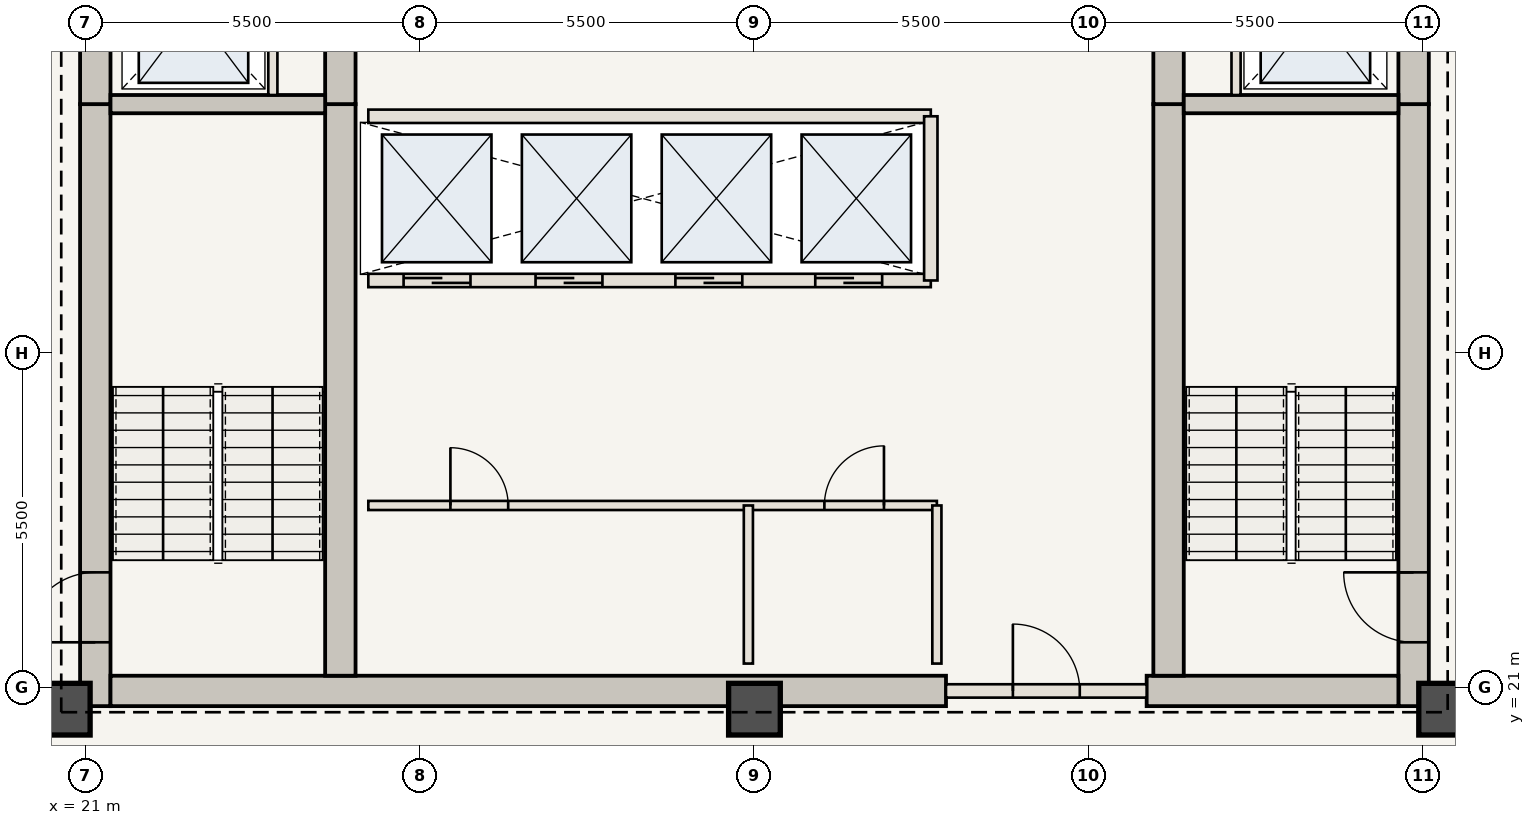
"""IFC4 building model, lengths in metres.
Left out: names, types, materials, properties, quantities, classifications, styles, units other than length and angle.
Written with IfcOpenShell. Run it as: python <this file> out.ifc"""

import sys

from ifc_helpers import new_model, si_unit, direction, frame, frame_2d, origin, origin_2d, place, context, subcontext, project, spatial, rectangle, extrude, element, fill, save


model = new_model("IFC4")
c1 = context("Model", 3, precision=1e-05, world=origin(), true_north=direction((0.0, 1.0)))
c2 = subcontext(c1, "Body", "Model", "MODEL_VIEW")
j1 = project(units=[si_unit("LENGTHUNIT", "METRE"), si_unit("PLANEANGLEUNIT", "RADIAN")], contexts=[c1])
p1 = place(None, origin())
s1 = spatial("IfcSite", under=j1, at=p1, CompositionType="ELEMENT")
p2 = place(p1, origin())
s2 = spatial("IfcBuilding", under=s1, at=p2, CompositionType="ELEMENT")
p3 = place(p2, frame((0.0, 0.0, 221.55)))
s3 = spatial("IfcBuildingStorey", under=s2, at=p3, CompositionType="ELEMENT", Elevation=221.55)
p4 = place(p3, frame((21.16, 20.7, 0.0), z_axis=(0.0, 0.0, 1.0), x_axis=(0.0, 1.0, 0.0)))
e1 = element("IfcWall", 1, at=p4, inside=s3, PredefinedType="SHEAR", context=c2, shape_type="SweptSolid", body=[
    extrude(rectangle(XDim=9.9, YDim=0.5, at=frame_2d((4.95, 0.0))), origin(), (0.0, 0.0, 1.0), 3.85),
])
p5 = place(p4, frame((1.05, 0.0, 0.0)))
e2 = element("IfcOpeningElement", 2, at=p5, cuts=e1, PredefinedType="OPENING", context=c2, shape_type="SweptSolid", body=[
    extrude(rectangle(XDim=1.15, YDim=2.15, at=frame_2d((0.575, 1.075))), frame((0.0, 0.26, 0.0), z_axis=(0.0, -1.0, 0.0), x_axis=(1.0, 0.0, 0.0)), (0.0, 0.0, 1.0), 0.52),
])
p6 = place(p3, frame((21.16, 30.6, 0.0), z_axis=(0.0, 0.0, 1.0), x_axis=(0.0, 1.0, 0.0)))
e3 = element("IfcWall", 3, at=p6, inside=s3, PredefinedType="SHEAR", context=c2, shape_type="SweptSolid", body=[
    extrude(rectangle(XDim=12.65, YDim=0.5, at=frame_2d((6.325, 0.0))), origin(), (0.0, 0.0, 1.0), 3.85),
])
p7 = place(p6, frame((4.2, 0.0, 0.0)))
e4 = element("IfcOpeningElement", 4, at=p7, cuts=e3, PredefinedType="OPENING", context=c2, shape_type="SweptSolid", body=[
    extrude(rectangle(XDim=1.1, YDim=2.15, at=frame_2d((0.55, 1.075))), frame((0.0, 0.26, 0.0), z_axis=(0.0, -1.0, 0.0), x_axis=(1.0, 0.0, 0.0)), (0.0, 0.0, 1.0), 0.52),
])
p8 = place(p6, frame((8.05, 0.0, 0.0)))
e5 = element("IfcOpeningElement", 5, at=p8, cuts=e3, PredefinedType="OPENING", context=c2, shape_type="SweptSolid", body=[
    extrude(rectangle(XDim=0.92, YDim=2.1, at=frame_2d((0.46, 1.05))), frame((0.0, 0.26, 0.0), z_axis=(0.0, -1.0, 0.0), x_axis=(1.0, 0.0, 0.0)), (0.0, 0.0, 1.0), 0.52),
])
p9 = place(p6, frame((9.45, 0.0, 0.0)))
e6 = element("IfcOpeningElement", 6, at=p9, cuts=e3, PredefinedType="OPENING", context=c2, shape_type="SweptSolid", body=[
    extrude(rectangle(XDim=0.88, YDim=2.1, at=frame_2d((0.44, 1.05))), frame((0.0, 0.26, 0.0), z_axis=(0.0, -1.0, 0.0), x_axis=(1.0, 0.0, 0.0)), (0.0, 0.0, 1.0), 0.52),
])
p10 = place(p6, frame((10.85, 0.0, 0.0)))
e7 = element("IfcOpeningElement", 7, at=p10, cuts=e3, PredefinedType="OPENING", context=c2, shape_type="SweptSolid", body=[
    extrude(rectangle(XDim=0.88, YDim=2.1, at=frame_2d((0.44, 1.05))), frame((0.0, 0.26, 0.0), z_axis=(0.0, -1.0, 0.0), x_axis=(1.0, 0.0, 0.0)), (0.0, 0.0, 1.0), 0.52),
])
p11 = place(p3, frame((42.84, 20.7, 0.0), z_axis=(0.0, 0.0, 1.0), x_axis=(0.0, 1.0, 0.0)))
e8 = element("IfcWall", 8, at=p11, inside=s3, PredefinedType="SHEAR", context=c2, shape_type="SweptSolid", body=[
    extrude(rectangle(XDim=9.9, YDim=0.5, at=frame_2d((4.95, 0.0))), origin(), (0.0, 0.0, 1.0), 3.85),
])
p12 = place(p11, frame((1.05, 0.0, 0.0)))
e9 = element("IfcOpeningElement", 9, at=p12, cuts=e8, PredefinedType="OPENING", context=c2, shape_type="SweptSolid", body=[
    extrude(rectangle(XDim=1.15, YDim=2.15, at=frame_2d((0.575, 1.075))), frame((0.0, 0.26, 0.0), z_axis=(0.0, -1.0, 0.0), x_axis=(1.0, 0.0, 0.0)), (0.0, 0.0, 1.0), 0.52),
])
p13 = place(p3, frame((42.84, 30.6, 0.0), z_axis=(0.0, 0.0, 1.0), x_axis=(0.0, 1.0, 0.0)))
e10 = element("IfcWall", 10, at=p13, inside=s3, PredefinedType="SHEAR", context=c2, shape_type="SweptSolid", body=[
    extrude(rectangle(XDim=12.65, YDim=0.5, at=frame_2d((6.325, 0.0))), origin(), (0.0, 0.0, 1.0), 3.85),
])
p14 = place(p13, frame((4.2, 0.0, 0.0)))
e11 = element("IfcOpeningElement", 11, at=p14, cuts=e10, PredefinedType="OPENING", context=c2, shape_type="SweptSolid", body=[
    extrude(rectangle(XDim=1.1, YDim=2.15, at=frame_2d((0.55, 1.075))), frame((0.0, 0.26, 0.0), z_axis=(0.0, -1.0, 0.0), x_axis=(1.0, 0.0, 0.0)), (0.0, 0.0, 1.0), 0.52),
])
p15 = place(p13, frame((9.2, 0.0, 0.0)))
e12 = element("IfcOpeningElement", 12, at=p15, cuts=e10, PredefinedType="OPENING", context=c2, shape_type="SweptSolid", body=[
    extrude(rectangle(XDim=0.92, YDim=2.1, at=frame_2d((0.46, 1.05))), frame((0.0, 0.26, 0.0), z_axis=(0.0, -1.0, 0.0), x_axis=(1.0, 0.0, 0.0)), (0.0, 0.0, 1.0), 0.52),
])
p16 = place(p3, frame((21.41, 20.95, 0.0), z_axis=(0.0, 0.0, 1.0), x_axis=(1.0, 0.0, 0.0)))
e13 = element("IfcWall", 13, at=p16, inside=s3, PredefinedType="SHEAR", context=c2, shape_type="SweptSolid", body=[
    extrude(rectangle(XDim=13.74, YDim=0.5, at=frame_2d((6.87, 0.0))), origin(), (0.0, 0.0, 1.0), 3.85),
])
p17 = place(p3, frame((38.45, 20.95, 0.0), z_axis=(0.0, 0.0, 1.0), x_axis=(1.0, 0.0, 0.0)))
e14 = element("IfcWall", 14, at=p17, inside=s3, PredefinedType="SHEAR", context=c2, shape_type="SweptSolid", body=[
    extrude(rectangle(XDim=4.14, YDim=0.5, at=frame_2d((2.07, 0.0))), origin(), (0.0, 0.0, 1.0), 3.85),
])
p18 = place(p3, frame((25.19, 21.2, 0.0), z_axis=(0.0, 0.0, 1.0), x_axis=(0.0, 1.0, 0.0)))
e15 = element("IfcWall", 15, at=p18, inside=s3, PredefinedType="SHEAR", context=c2, shape_type="SweptSolid", body=[
    extrude(rectangle(XDim=9.4, YDim=0.5, at=frame_2d((4.7, 0.0))), origin(), (0.0, 0.0, 1.0), 3.85),
])
p19 = place(p3, frame((25.19, 30.6, 0.0), z_axis=(0.0, 0.0, 1.0), x_axis=(0.0, 1.0, 0.0)))
e16 = element("IfcWall", 16, at=p19, inside=s3, PredefinedType="SHEAR", context=c2, shape_type="SweptSolid", body=[
    extrude(rectangle(XDim=12.15, YDim=0.5, at=frame_2d((6.075, 0.0))), origin(), (0.0, 0.0, 1.0), 3.85),
])
p20 = place(p19, frame((6.25, 0.0, 0.0)))
e17 = element("IfcOpeningElement", 17, at=p20, cuts=e16, PredefinedType="OPENING", context=c2, shape_type="SweptSolid", body=[
    extrude(rectangle(XDim=1.1, YDim=2.15, at=frame_2d((0.55, 1.075))), frame((0.0, 0.26, 0.0), z_axis=(0.0, -1.0, 0.0), x_axis=(1.0, 0.0, 0.0)), (0.0, 0.0, 1.0), 0.52),
])
p21 = place(p3, frame((38.81, 21.2, 0.0), z_axis=(0.0, 0.0, 1.0), x_axis=(0.0, 1.0, 0.0)))
e18 = element("IfcWall", 18, at=p21, inside=s3, PredefinedType="SHEAR", context=c2, shape_type="SweptSolid", body=[
    extrude(rectangle(XDim=9.4, YDim=0.5, at=frame_2d((4.7, 0.0))), origin(), (0.0, 0.0, 1.0), 3.85),
])
p22 = place(p3, frame((38.81, 30.6, 0.0), z_axis=(0.0, 0.0, 1.0), x_axis=(0.0, 1.0, 0.0)))
e19 = element("IfcWall", 19, at=p22, inside=s3, PredefinedType="SHEAR", context=c2, shape_type="SweptSolid", body=[
    extrude(rectangle(XDim=12.15, YDim=0.5, at=frame_2d((6.075, 0.0))), origin(), (0.0, 0.0, 1.0), 3.85),
])
for number, where, z_axis, x_axis in (
    (20, (20.65, 20.65, 0.0), (0.0, 0.0, 1.0), (1.0, 0.0, 0.0)),
    (21, (32.0, 20.65, 0.0), (0.0, 0.0, 1.0), (1.0, 0.0, 0.0)),
    (22, (43.35, 20.65, 0.0), (0.0, 0.0, 1.0), (1.0, 0.0, 0.0)),
):
    element("IfcColumn", number, at=place(p3, frame(where, z_axis=z_axis, x_axis=x_axis)), inside=s3, PredefinedType="COLUMN", context=c2, shape_type="SweptSolid", body=[
        extrude(rectangle(XDim=0.85, YDim=0.85, at=origin_2d()), origin(), (0.0, 0.0, 1.0), 3.85),
    ])
for number, where, z_axis, x_axis in (
    (23, (21.41, 30.6, 0.0), (0.0, 0.0, 1.0), (1.0, 0.0, 0.0)),
    (24, (39.06, 30.6, 0.0), (0.0, 0.0, 1.0), (1.0, 0.0, 0.0)),
):
    element("IfcWall", number, at=place(p3, frame(where, z_axis=z_axis, x_axis=x_axis)), inside=s3, PredefinedType="SHEAR", context=c2, shape_type="SweptSolid", body=[
        extrude(rectangle(XDim=3.53, YDim=0.3, at=frame_2d((1.765, 0.0))), origin(), (0.0, 0.0, 1.0), 3.685),
    ])
for number, where, z_axis, x_axis in (
    (25, (24.08, 30.75, 0.0), (0.0, 0.0, 1.0), (0.0, 1.0, 0.0)),
    (26, (39.92, 30.75, 0.0), (0.0, 0.0, 1.0), (0.0, 1.0, 0.0)),
):
    element("IfcWall", number, at=place(p3, frame(where, z_axis=z_axis, x_axis=x_axis)), inside=s3, PredefinedType="STANDARD", context=c2, shape_type="SweptSolid", body=[
        extrude(rectangle(XDim=2.65, YDim=0.15, at=frame_2d((1.325, 0.0))), origin(), (0.0, 0.0, 1.0), 3.685),
    ])
p23 = place(p3, frame((35.15, 20.95, 0.0), z_axis=(0.0, 0.0, 1.0), x_axis=(1.0, 0.0, 0.0)))
e27 = element("IfcWall", 27, at=p23, inside=s3, PredefinedType="STANDARD", context=c2, shape_type="SweptSolid", body=[
    extrude(rectangle(XDim=3.3, YDim=0.22, at=frame_2d((1.65, 0.0))), origin(), (0.0, 0.0, 1.0), 3.685),
])
p24 = place(p23, frame((1.1, 0.0, 0.0)))
e28 = element("IfcOpeningElement", 28, at=p24, cuts=e27, PredefinedType="OPENING", context=c2, shape_type="SweptSolid", body=[
    extrude(rectangle(XDim=1.1, YDim=2.15, at=frame_2d((0.55, 1.075))), frame((0.0, 0.12, 0.0), z_axis=(0.0, -1.0, 0.0), x_axis=(1.0, 0.0, 0.0)), (0.0, 0.0, 1.0), 0.24),
])
p25 = place(p3, frame((25.65, 24.0, 0.0), z_axis=(0.0, 0.0, 1.0), x_axis=(1.0, 0.0, 0.0)))
e29 = element("IfcWall", 29, at=p25, inside=s3, PredefinedType="STANDARD", context=c2, shape_type="SweptSolid", body=[
    extrude(rectangle(XDim=9.35, YDim=0.15, at=frame_2d((4.675, 0.0))), origin(), (0.0, 0.0, 1.0), 3.685),
])
p26 = place(p25, frame((1.35, 0.0, 0.0)))
e30 = element("IfcOpeningElement", 30, at=p26, cuts=e29, PredefinedType="OPENING", context=c2, shape_type="SweptSolid", body=[
    extrude(rectangle(XDim=0.95, YDim=2.15, at=frame_2d((0.475, 1.075))), frame((0.0, 0.085, 0.0), z_axis=(0.0, -1.0, 0.0), x_axis=(1.0, 0.0, 0.0)), (0.0, 0.0, 1.0), 0.17),
])
p27 = place(p25, frame((7.5, 0.0, 0.0)))
e31 = element("IfcOpeningElement", 31, at=p27, cuts=e29, PredefinedType="OPENING", context=c2, shape_type="SweptSolid", body=[
    extrude(rectangle(XDim=0.98, YDim=2.2, at=frame_2d((0.49, 1.1))), frame((0.0, 0.085, 0.0), z_axis=(0.0, -1.0, 0.0), x_axis=(1.0, 0.0, 0.0)), (0.0, 0.0, 1.0), 0.17),
])
for number, where, z_axis, x_axis in (
    (32, (31.9, 21.4, 0.0), (0.0, 0.0, 1.0), (0.0, 1.0, 0.0)),
    (33, (35.0, 21.4, 0.0), (0.0, 0.0, 1.0), (0.0, 1.0, 0.0)),
):
    element("IfcWall", number, at=place(p3, frame(where, z_axis=z_axis, x_axis=x_axis)), inside=s3, PredefinedType="STANDARD", context=c2, shape_type="SweptSolid", body=[
        extrude(rectangle(XDim=2.6, YDim=0.15, at=frame_2d((1.3, 0.0))), origin(), (0.0, 0.0, 1.0), 3.685),
    ])
p28 = place(p3, frame((25.65, 27.7, 0.0), z_axis=(0.0, 0.0, 1.0), x_axis=(1.0, 0.0, 0.0)))
e34 = element("IfcWall", 34, at=p28, inside=s3, PredefinedType="STANDARD", context=c2, shape_type="SweptSolid", body=[
    extrude(rectangle(XDim=9.25, YDim=0.22, at=frame_2d((4.625, 0.0))), origin(), (0.0, 0.0, 1.0), 3.685),
])
p29 = place(p28, frame((0.58, 0.0, 0.0)))
e35 = element("IfcOpeningElement", 35, at=p29, cuts=e34, PredefinedType="OPENING", context=c2, shape_type="SweptSolid", body=[
    extrude(rectangle(XDim=1.1, YDim=2.15, at=frame_2d((0.55, 1.075))), frame((0.0, 0.12, 0.0), z_axis=(0.0, -1.0, 0.0), x_axis=(1.0, 0.0, 0.0)), (0.0, 0.0, 1.0), 0.24),
])
p30 = place(p28, frame((2.75, 0.0, 0.0)))
e36 = element("IfcOpeningElement", 36, at=p30, cuts=e34, PredefinedType="OPENING", context=c2, shape_type="SweptSolid", body=[
    extrude(rectangle(XDim=1.1, YDim=2.15, at=frame_2d((0.55, 1.075))), frame((0.0, 0.12, 0.0), z_axis=(0.0, -1.0, 0.0), x_axis=(1.0, 0.0, 0.0)), (0.0, 0.0, 1.0), 0.24),
])
p31 = place(p28, frame((5.05, 0.0, 0.0)))
e37 = element("IfcOpeningElement", 37, at=p31, cuts=e34, PredefinedType="OPENING", context=c2, shape_type="SweptSolid", body=[
    extrude(rectangle(XDim=1.1, YDim=2.15, at=frame_2d((0.55, 1.075))), frame((0.0, 0.12, 0.0), z_axis=(0.0, -1.0, 0.0), x_axis=(1.0, 0.0, 0.0)), (0.0, 0.0, 1.0), 0.24),
])
p32 = place(p28, frame((7.35, 0.0, 0.0)))
e38 = element("IfcOpeningElement", 38, at=p32, cuts=e34, PredefinedType="OPENING", context=c2, shape_type="SweptSolid", body=[
    extrude(rectangle(XDim=1.1, YDim=2.15, at=frame_2d((0.55, 1.075))), frame((0.0, 0.12, 0.0), z_axis=(0.0, -1.0, 0.0), x_axis=(1.0, 0.0, 0.0)), (0.0, 0.0, 1.0), 0.24),
])
p33 = place(p3, frame((25.65, 30.4, 0.0), z_axis=(0.0, 0.0, 1.0), x_axis=(1.0, 0.0, 0.0)))
e39 = element("IfcWall", 39, at=p33, inside=s3, PredefinedType="STANDARD", context=c2, shape_type="SweptSolid", body=[
    extrude(rectangle(XDim=9.25, YDim=0.22, at=frame_2d((4.625, 0.0))), origin(), (0.0, 0.0, 1.0), 3.685),
])
p34 = place(p3, frame((34.9, 27.7, 0.0), z_axis=(0.0, 0.0, 1.0), x_axis=(0.0, 1.0, 0.0)))
e40 = element("IfcWall", 40, at=p34, inside=s3, PredefinedType="STANDARD", context=c2, shape_type="SweptSolid", body=[
    extrude(rectangle(XDim=2.7, YDim=0.22, at=frame_2d((1.35, 0.0))), origin(), (0.0, 0.0, 1.0), 3.685),
])
p35 = place(p5, origin())
e41 = element("IfcDoor", 41, at=p35, inside=s3, OperationType="SINGLE_SWING_LEFT", PredefinedType="DOOR", context=c2, shape_type="SweptSolid", body=[
    extrude(rectangle(XDim=1.15, YDim=2.15, at=frame_2d((0.575, 1.075))), frame((0.0, 0.025, 0.0), z_axis=(0.0, -1.0, 0.0), x_axis=(1.0, 0.0, 0.0)), (0.0, 0.0, 1.0), 0.05),
])
fill(e2, e41)
p36 = place(p12, origin())
e42 = element("IfcDoor", 42, at=p36, inside=s3, OperationType="SINGLE_SWING_RIGHT", PredefinedType="DOOR", context=c2, shape_type="SweptSolid", body=[
    extrude(rectangle(XDim=1.15, YDim=2.15, at=frame_2d((0.575, 1.075))), frame((0.0, 0.025, 0.0), z_axis=(0.0, -1.0, 0.0), x_axis=(1.0, 0.0, 0.0)), (0.0, 0.0, 1.0), 0.05),
])
fill(e9, e42)
p37 = place(p24, origin())
e43 = element("IfcDoor", 43, at=p37, inside=s3, OperationType="SINGLE_SWING_LEFT", PredefinedType="DOOR", context=c2, shape_type="SweptSolid", body=[
    extrude(rectangle(XDim=1.1, YDim=2.15, at=frame_2d((0.55, 1.075))), frame((0.0, 0.025, 0.0), z_axis=(0.0, -1.0, 0.0), x_axis=(1.0, 0.0, 0.0)), (0.0, 0.0, 1.0), 0.05),
])
fill(e28, e43)
p38 = place(p26, origin())
e44 = element("IfcDoor", 44, at=p38, inside=s3, OperationType="SINGLE_SWING_LEFT", PredefinedType="DOOR", context=c2, shape_type="SweptSolid", body=[
    extrude(rectangle(XDim=0.95, YDim=2.15, at=frame_2d((0.475, 1.075))), frame((0.0, 0.025, 0.0), z_axis=(0.0, -1.0, 0.0), x_axis=(1.0, 0.0, 0.0)), (0.0, 0.0, 1.0), 0.05),
])
fill(e30, e44)
p39 = place(p27, origin())
e45 = element("IfcDoor", 45, at=p39, inside=s3, OperationType="SINGLE_SWING_RIGHT", PredefinedType="DOOR", context=c2, shape_type="SweptSolid", body=[
    extrude(rectangle(XDim=0.98, YDim=2.2, at=frame_2d((0.49, 1.1))), frame((0.0, 0.025, 0.0), z_axis=(0.0, -1.0, 0.0), x_axis=(1.0, 0.0, 0.0)), (0.0, 0.0, 1.0), 0.05),
])
fill(e31, e45)
p40 = place(p29, origin())
e46 = element("IfcDoor", 46, at=p40, inside=s3, OperationType="DOUBLE_DOOR_SLIDING", PredefinedType="DOOR", context=c2, shape_type="SweptSolid", body=[
    extrude(rectangle(XDim=1.1, YDim=2.15, at=frame_2d((0.55, 1.075))), frame((0.0, 0.025, 0.0), z_axis=(0.0, -1.0, 0.0), x_axis=(1.0, 0.0, 0.0)), (0.0, 0.0, 1.0), 0.05),
])
fill(e35, e46)
p41 = place(p30, origin())
e47 = element("IfcDoor", 47, at=p41, inside=s3, OperationType="DOUBLE_DOOR_SLIDING", PredefinedType="DOOR", context=c2, shape_type="SweptSolid", body=[
    extrude(rectangle(XDim=1.1, YDim=2.15, at=frame_2d((0.55, 1.075))), frame((0.0, 0.025, 0.0), z_axis=(0.0, -1.0, 0.0), x_axis=(1.0, 0.0, 0.0)), (0.0, 0.0, 1.0), 0.05),
])
fill(e36, e47)
p42 = place(p31, origin())
e48 = element("IfcDoor", 48, at=p42, inside=s3, OperationType="DOUBLE_DOOR_SLIDING", PredefinedType="DOOR", context=c2, shape_type="SweptSolid", body=[
    extrude(rectangle(XDim=1.1, YDim=2.15, at=frame_2d((0.55, 1.075))), frame((0.0, 0.025, 0.0), z_axis=(0.0, -1.0, 0.0), x_axis=(1.0, 0.0, 0.0)), (0.0, 0.0, 1.0), 0.05),
])
fill(e37, e48)
p43 = place(p32, origin())
e49 = element("IfcDoor", 49, at=p43, inside=s3, OperationType="DOUBLE_DOOR_SLIDING", PredefinedType="DOOR", context=c2, shape_type="SweptSolid", body=[
    extrude(rectangle(XDim=1.1, YDim=2.15, at=frame_2d((0.55, 1.075))), frame((0.0, 0.025, 0.0), z_axis=(0.0, -1.0, 0.0), x_axis=(1.0, 0.0, 0.0)), (0.0, 0.0, 1.0), 0.05),
])
fill(e38, e49)
save(model, sys.argv[1])
